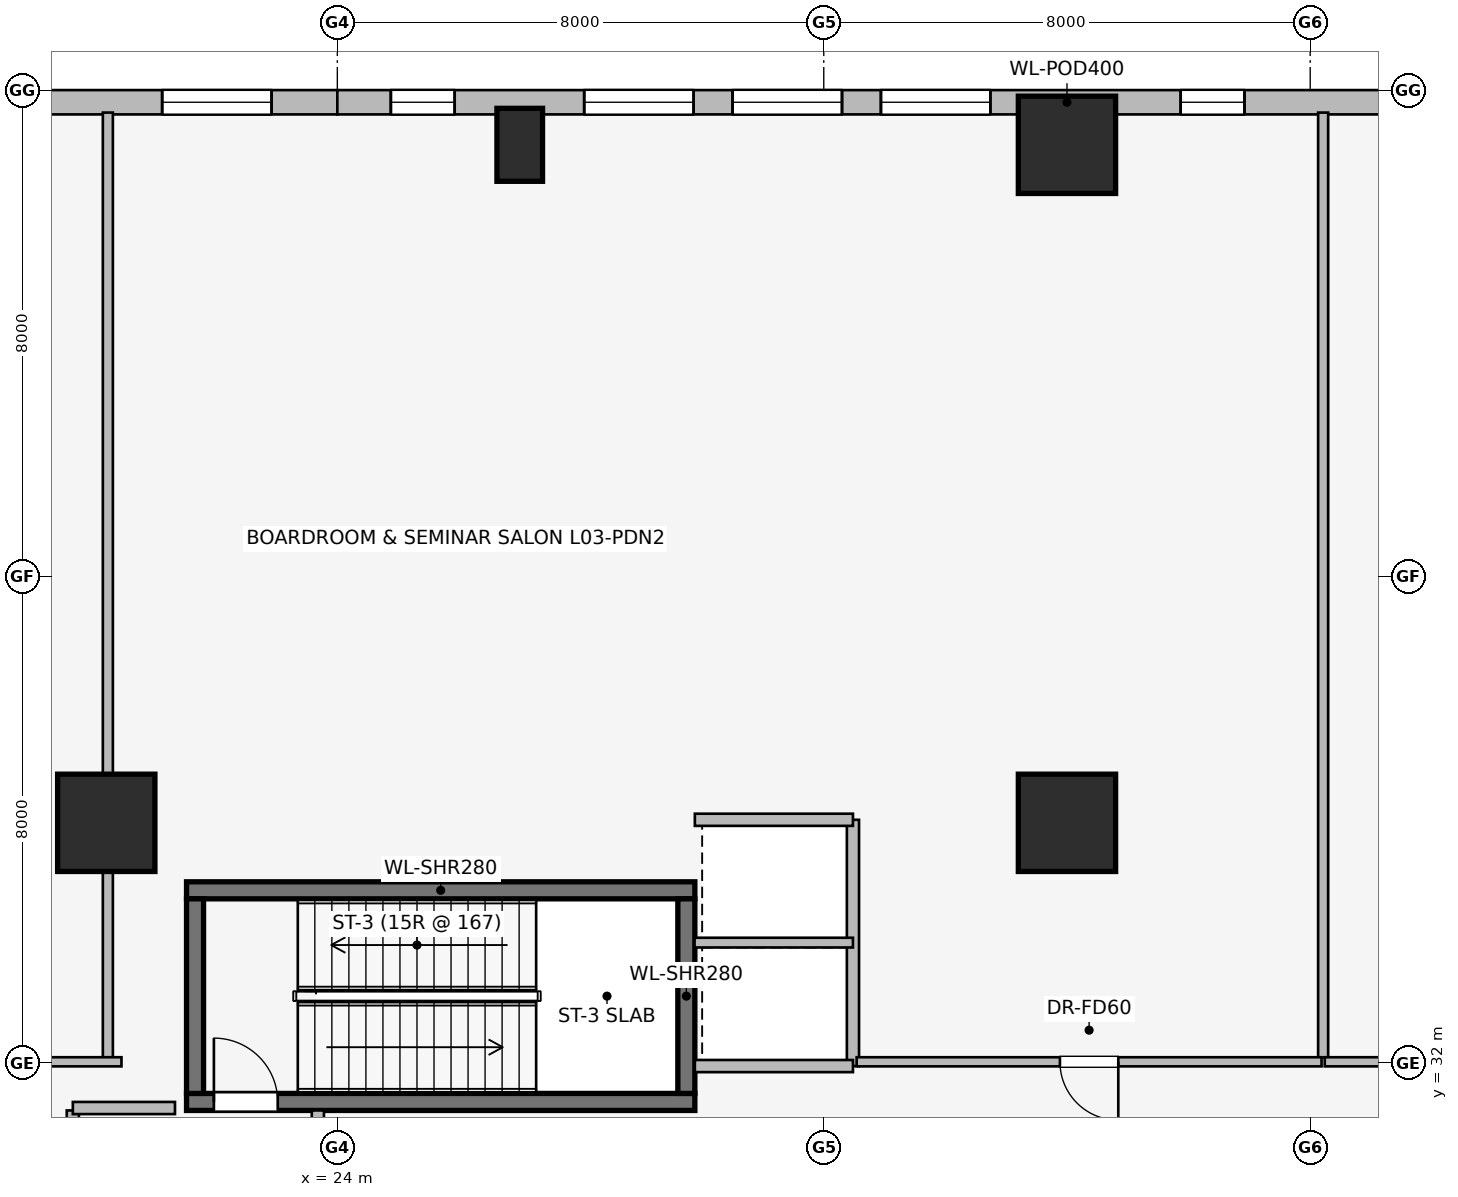
"""IFC4 building model, lengths in metres.
Left out: names, types, materials, properties, quantities, classifications, styles, units other than length and angle.
Written with IfcOpenShell. Run it as: python <this file> out.ifc"""

import sys

from ifc_helpers import new_model, si_unit, direction, frame, frame_2d, origin, origin_2d, place, context, subcontext, project, spatial, rectangle, extrude, element, fill, save


model = new_model("IFC4")
c1 = context("Model", 3, precision=1e-05, world=origin(), true_north=direction((0.0, 1.0)))
c2 = subcontext(c1, "Body", "Model", "MODEL_VIEW")
j1 = project(units=[si_unit("LENGTHUNIT", "METRE"), si_unit("PLANEANGLEUNIT", "RADIAN")], contexts=[c1])
p1 = place(None, origin())
s1 = spatial("IfcSite", under=j1, at=p1, CompositionType="ELEMENT")
p2 = place(p1, origin())
s2 = spatial("IfcBuilding", under=s1, at=p2, CompositionType="ELEMENT")
p3 = place(p2, frame((0.0, 0.0, 11.0)))
s3 = spatial("IfcBuildingStorey", under=s2, at=p3, CompositionType="ELEMENT", Elevation=11.0)
p4 = place(p3, frame((21.52, 31.36, 0.0), z_axis=(0.0, 0.0, 1.0), x_axis=(1.0, 0.0, 0.0)))
e1 = element("IfcWall", 1, at=p4, inside=s3, PredefinedType="SHEAR", context=c2, shape_type="SweptSolid", body=[
    extrude(rectangle(XDim=8.36, YDim=0.28, at=frame_2d((4.18, 0.0))), origin(), (0.0, 0.0, 1.0), 5.0),
])
p5 = place(p4, frame((0.45, 0.0, 0.0)))
e2 = element("IfcOpeningElement", 2, at=p5, cuts=e1, PredefinedType="OPENING", context=c2, shape_type="SweptSolid", body=[
    extrude(rectangle(XDim=1.05, YDim=2.0, at=frame_2d((0.525, 1.0))), frame((0.0, 0.15, 0.0), z_axis=(0.0, -1.0, 0.0), x_axis=(1.0, 0.0, 0.0)), (0.0, 0.0, 1.0), 0.3),
])
p6 = place(p3, frame((29.88, 34.84, 0.0), z_axis=(0.0, 0.0, 1.0), x_axis=(-1.0, 0.0, 0.0)))
e3 = element("IfcWall", 3, at=p6, inside=s3, PredefinedType="SHEAR", context=c2, shape_type="SweptSolid", body=[
    extrude(rectangle(XDim=8.36, YDim=0.28, at=frame_2d((4.18, 0.0))), origin(), (0.0, 0.0, 1.0), 5.0),
])
for number, where, z_axis, x_axis in (
    (4, (21.66, 34.7, 0.0), (0.0, 0.0, 1.0), (0.0, -1.0, 0.0)),
    (5, (29.74, 31.5, 0.0), (0.0, 0.0, 1.0), (0.0, 1.0, 0.0)),
):
    element("IfcWall", number, at=place(p3, frame(where, z_axis=z_axis, x_axis=x_axis)), inside=s3, PredefinedType="SHEAR", context=c2, shape_type="SweptSolid", body=[
        extrude(rectangle(XDim=3.2, YDim=0.28, at=frame_2d((1.6, 0.0))), origin(), (0.0, 0.0, 1.0), 5.0),
    ])
for number, where, z_axis, x_axis in (
    (6, (36.0, 47.1, 0.0), (0.0, 0.0, 1.0), (1.0, 0.0, 0.0)),
    (7, (20.2, 35.95, 0.0), (0.0, 0.0, 1.0), (1.0, 0.0, 0.0)),
    (8, (36.0, 35.95, 0.0), (0.0, 0.0, 1.0), (1.0, 0.0, 0.0)),
):
    element("IfcColumn", number, at=place(p3, frame(where, z_axis=z_axis, x_axis=x_axis)), inside=s3, PredefinedType="COLUMN", context=c2, shape_type="SweptSolid", body=[
        extrude(rectangle(XDim=1.6, YDim=1.6, at=origin_2d()), origin(), (0.0, 0.0, 1.0), 5.0),
    ])
p7 = place(p3, frame((27.0, 47.1, 0.0), z_axis=(0.0, 0.0, 1.0), x_axis=(1.0, 0.0, 0.0)))
e9 = element("IfcColumn", 9, at=p7, inside=s3, PredefinedType="PILASTER", context=c2, shape_type="SweptSolid", body=[
    extrude(rectangle(XDim=0.75, YDim=1.2, at=origin_2d()), origin(), (0.0, 0.0, 1.0), 5.0),
])
p8 = place(p3, frame((0.0, 47.8, 0.0), z_axis=(0.0, 0.0, 1.0), x_axis=(1.0, 0.0, 0.0)))
e10 = element("IfcWall", 10, at=p8, inside=s3, PredefinedType="STANDARD", context=c2, shape_type="SweptSolid", body=[
    extrude(rectangle(XDim=24.0, YDim=0.4, at=frame_2d((12.0, 0.0))), origin(), (0.0, 0.0, 1.0), 4.69),
])
p9 = place(p8, frame((3.65, 0.0, 0.75)))
e11 = element("IfcOpeningElement", 11, at=p9, cuts=e10, PredefinedType="OPENING", context=c2, shape_type="SweptSolid", body=[
    extrude(rectangle(XDim=2.8, YDim=1.8, at=frame_2d((1.4, 0.9))), frame((0.0, 0.21, 0.0), z_axis=(0.0, -1.0, 0.0), x_axis=(1.0, 0.0, 0.0)), (0.0, 0.0, 1.0), 0.42),
])
p10 = place(p8, frame((10.27, 0.0, 0.75)))
e12 = element("IfcOpeningElement", 12, at=p10, cuts=e10, PredefinedType="OPENING", context=c2, shape_type="SweptSolid", body=[
    extrude(rectangle(XDim=1.8, YDim=1.5, at=frame_2d((0.9, 0.75))), frame((0.0, 0.21, 0.0), z_axis=(0.0, -1.0, 0.0), x_axis=(1.0, 0.0, 0.0)), (0.0, 0.0, 1.0), 0.42),
])
p11 = place(p8, frame((13.13, 0.0, 0.75)))
e13 = element("IfcOpeningElement", 13, at=p11, cuts=e10, PredefinedType="OPENING", context=c2, shape_type="SweptSolid", body=[
    extrude(rectangle(XDim=1.8, YDim=1.5, at=frame_2d((0.9, 0.75))), frame((0.0, 0.21, 0.0), z_axis=(0.0, -1.0, 0.0), x_axis=(1.0, 0.0, 0.0)), (0.0, 0.0, 1.0), 0.42),
])
p12 = place(p8, frame((18.077, 0.0, 0.75)))
e14 = element("IfcOpeningElement", 14, at=p12, cuts=e10, PredefinedType="OPENING", context=c2, shape_type="SweptSolid", body=[
    extrude(rectangle(XDim=1.05, YDim=1.4, at=frame_2d((0.525, 0.7))), frame((0.0, 0.21, 0.0), z_axis=(0.0, -1.0, 0.0), x_axis=(1.0, 0.0, 0.0)), (0.0, 0.0, 1.0), 0.42),
])
p13 = place(p8, frame((21.119, 0.0, 0.75)))
e15 = element("IfcOpeningElement", 15, at=p13, cuts=e10, PredefinedType="OPENING", context=c2, shape_type="SweptSolid", body=[
    extrude(rectangle(XDim=1.8, YDim=1.5, at=frame_2d((0.9, 0.75))), frame((0.0, 0.21, 0.0), z_axis=(0.0, -1.0, 0.0), x_axis=(1.0, 0.0, 0.0)), (0.0, 0.0, 1.0), 0.42),
])
p14 = place(p3, frame((24.0, 47.8, 0.0), z_axis=(0.0, 0.0, 1.0), x_axis=(1.0, 0.0, 0.0)))
e16 = element("IfcWall", 16, at=p14, inside=s3, PredefinedType="STANDARD", context=c2, shape_type="SweptSolid", body=[
    extrude(rectangle(XDim=24.0, YDim=0.4, at=frame_2d((12.0, 0.0))), origin(), (0.0, 0.0, 1.0), 4.69),
])
p15 = place(p14, frame((0.88, 0.0, 0.75)))
e17 = element("IfcOpeningElement", 17, at=p15, cuts=e16, PredefinedType="OPENING", context=c2, shape_type="SweptSolid", body=[
    extrude(rectangle(XDim=1.05, YDim=1.4, at=frame_2d((0.525, 0.7))), frame((0.0, 0.21, 0.0), z_axis=(0.0, -1.0, 0.0), x_axis=(1.0, 0.0, 0.0)), (0.0, 0.0, 1.0), 0.42),
])
p16 = place(p14, frame((4.06, 0.0, 0.75)))
e18 = element("IfcOpeningElement", 18, at=p16, cuts=e16, PredefinedType="OPENING", context=c2, shape_type="SweptSolid", body=[
    extrude(rectangle(XDim=1.8, YDim=1.5, at=frame_2d((0.9, 0.75))), frame((0.0, 0.21, 0.0), z_axis=(0.0, -1.0, 0.0), x_axis=(1.0, 0.0, 0.0)), (0.0, 0.0, 1.0), 0.42),
])
p17 = place(p14, frame((6.5, 0.0, 0.75)))
e19 = element("IfcOpeningElement", 19, at=p17, cuts=e16, PredefinedType="OPENING", context=c2, shape_type="SweptSolid", body=[
    extrude(rectangle(XDim=1.8, YDim=1.5, at=frame_2d((0.9, 0.75))), frame((0.0, 0.21, 0.0), z_axis=(0.0, -1.0, 0.0), x_axis=(1.0, 0.0, 0.0)), (0.0, 0.0, 1.0), 0.42),
])
p18 = place(p14, frame((8.94, 0.0, 0.75)))
e20 = element("IfcOpeningElement", 20, at=p18, cuts=e16, PredefinedType="OPENING", context=c2, shape_type="SweptSolid", body=[
    extrude(rectangle(XDim=1.8, YDim=1.5, at=frame_2d((0.9, 0.75))), frame((0.0, 0.21, 0.0), z_axis=(0.0, -1.0, 0.0), x_axis=(1.0, 0.0, 0.0)), (0.0, 0.0, 1.0), 0.42),
])
p19 = place(p14, frame((13.87, 0.0, 0.75)))
e21 = element("IfcOpeningElement", 21, at=p19, cuts=e16, PredefinedType="OPENING", context=c2, shape_type="SweptSolid", body=[
    extrude(rectangle(XDim=1.05, YDim=1.4, at=frame_2d((0.525, 0.7))), frame((0.0, 0.21, 0.0), z_axis=(0.0, -1.0, 0.0), x_axis=(1.0, 0.0, 0.0)), (0.0, 0.0, 1.0), 0.42),
])
p20 = place(p14, frame((17.518, 0.0, 0.75)))
e22 = element("IfcOpeningElement", 22, at=p20, cuts=e16, PredefinedType="OPENING", context=c2, shape_type="SweptSolid", body=[
    extrude(rectangle(XDim=1.8, YDim=1.5, at=frame_2d((0.9, 0.75))), frame((0.0, 0.21, 0.0), z_axis=(0.0, -1.0, 0.0), x_axis=(1.0, 0.0, 0.0)), (0.0, 0.0, 1.0), 0.42),
])
p21 = place(p14, frame((22.07, 0.0, 0.75)))
e23 = element("IfcOpeningElement", 23, at=p21, cuts=e16, PredefinedType="OPENING", context=c2, shape_type="SweptSolid", body=[
    extrude(rectangle(XDim=1.05, YDim=1.4, at=frame_2d((0.525, 0.7))), frame((0.0, 0.21, 0.0), z_axis=(0.0, -1.0, 0.0), x_axis=(1.0, 0.0, 0.0)), (0.0, 0.0, 1.0), 0.42),
])
p22 = place(p3, frame((19.65, 25.68, 0.0), z_axis=(0.0, 0.0, 1.0), x_axis=(0.0, 1.0, 0.0)))
e24 = element("IfcWall", 24, at=p22, inside=s3, PredefinedType="PARTITIONING", context=c2, shape_type="SweptSolid", body=[
    extrude(rectangle(XDim=5.54, YDim=0.2, at=frame_2d((2.77, 0.0))), origin(), (0.0, 0.0, 1.0), 4.69),
])
p23 = place(p22, frame((0.62, 0.0, 0.0)))
e25 = element("IfcOpeningElement", 25, at=p23, cuts=e24, PredefinedType="OPENING", context=c2, shape_type="SweptSolid", body=[
    extrude(rectangle(XDim=1.1, YDim=2.2, at=frame_2d((0.55, 1.1))), frame((0.0, 0.11, 0.0), z_axis=(0.0, -1.0, 0.0), x_axis=(1.0, 0.0, 0.0)), (0.0, 0.0, 1.0), 0.22),
])
p24 = place(p22, frame((3.12, 0.0, 0.0)))
e26 = element("IfcOpeningElement", 26, at=p24, cuts=e24, PredefinedType="OPENING", context=c2, shape_type="SweptSolid", body=[
    extrude(rectangle(XDim=1.1, YDim=2.2, at=frame_2d((0.55, 1.1))), frame((0.0, 0.11, 0.0), z_axis=(0.0, -1.0, 0.0), x_axis=(1.0, 0.0, 0.0)), (0.0, 0.0, 1.0), 0.22),
])
p25 = place(p3, frame((23.68, 25.68, 0.0), z_axis=(0.0, 0.0, 1.0), x_axis=(0.0, 1.0, 0.0)))
e27 = element("IfcWall", 27, at=p25, inside=s3, PredefinedType="PARTITIONING", context=c2, shape_type="SweptSolid", body=[
    extrude(rectangle(XDim=5.54, YDim=0.2, at=frame_2d((2.77, 0.0))), origin(), (0.0, 0.0, 1.0), 4.69),
])
p26 = place(p25, frame((1.8, 0.0, 0.0)))
e28 = element("IfcOpeningElement", 28, at=p26, cuts=e27, PredefinedType="OPENING", context=c2, shape_type="SweptSolid", body=[
    extrude(rectangle(XDim=1.05, YDim=2.0, at=frame_2d((0.525, 1.0))), frame((0.0, 0.11, 0.0), z_axis=(0.0, -1.0, 0.0), x_axis=(1.0, 0.0, 0.0)), (0.0, 0.0, 1.0), 0.22),
])
p27 = place(p3, frame((21.33, 31.26, 0.0), z_axis=(0.0, 0.0, 1.0), x_axis=(-1.0, 0.0, 0.0)))
e29 = element("IfcWall", 29, at=p27, inside=s3, PredefinedType="PARTITIONING", context=c2, shape_type="SweptSolid", body=[
    extrude(rectangle(XDim=1.68, YDim=0.2, at=frame_2d((0.84, 0.0))), origin(), (0.0, 0.0, 1.0), 4.69),
])
p28 = place(p3, frame((32.48, 31.95, 0.0), z_axis=(0.0, 0.0, 1.0), x_axis=(0.0, 1.0, 0.0)))
e30 = element("IfcWall", 30, at=p28, inside=s3, PredefinedType="PARTITIONING", context=c2, shape_type="SweptSolid", body=[
    extrude(rectangle(XDim=4.05, YDim=0.2, at=frame_2d((2.025, 0.0))), origin(), (0.0, 0.0, 1.0), 4.69),
])
p29 = place(p3, frame((29.88, 36.0, 0.0), z_axis=(0.0, 0.0, 1.0), x_axis=(1.0, 0.0, 0.0)))
e31 = element("IfcWall", 31, at=p29, inside=s3, PredefinedType="PARTITIONING", context=c2, shape_type="SweptSolid", body=[
    extrude(rectangle(XDim=2.6, YDim=0.2, at=frame_2d((1.3, 0.0))), origin(), (0.0, 0.0, 1.0), 3.742),
])
p30 = place(p3, frame((32.48, 31.95, 0.0), z_axis=(0.0, 0.0, 1.0), x_axis=(-1.0, 0.0, 0.0)))
e32 = element("IfcWall", 32, at=p30, inside=s3, PredefinedType="PARTITIONING", context=c2, shape_type="SweptSolid", body=[
    extrude(rectangle(XDim=2.6, YDim=0.2, at=frame_2d((1.3, 0.0))), origin(), (0.0, 0.0, 1.0), 4.69),
])
p31 = place(p3, frame((29.875, 33.98, 0.0), z_axis=(0.0, 0.0, 1.0), x_axis=(1.0, 0.0, 0.0)))
e33 = element("IfcWall", 33, at=p31, inside=s3, PredefinedType="PARTITIONING", context=c2, shape_type="SweptSolid", body=[
    extrude(rectangle(XDim=2.605, YDim=0.16, at=frame_2d((1.302, 0.0))), origin(), (0.0, 0.0, 1.0), 4.69),
])
p32 = place(p3, frame((20.226, 32.09, 0.0), z_axis=(0.0, 0.0, 1.0), x_axis=(0.0, 1.0, 0.0)))
e34 = element("IfcWall", 34, at=p32, inside=s3, PredefinedType="PARTITIONING", context=c2, shape_type="SweptSolid", body=[
    extrude(rectangle(XDim=15.54, YDim=0.165, at=frame_2d((7.77, 0.0))), origin(), (0.0, 0.0, 1.0), 4.69),
])
p33 = place(p3, frame((40.213, 32.09, 0.0), z_axis=(0.0, 0.0, 1.0), x_axis=(0.0, 1.0, 0.0)))
e35 = element("IfcWall", 35, at=p33, inside=s3, PredefinedType="PARTITIONING", context=c2, shape_type="SweptSolid", body=[
    extrude(rectangle(XDim=15.54, YDim=0.165, at=frame_2d((7.77, 0.0))), origin(), (0.0, 0.0, 1.0), 4.082),
])
p34 = place(p3, frame((20.45, 32.02, 0.0), z_axis=(0.0, 0.0, 1.0), x_axis=(-1.0, 0.0, 0.0)))
e36 = element("IfcWall", 36, at=p34, inside=s3, PredefinedType="PARTITIONING", context=c2, shape_type="SweptSolid", body=[
    extrude(rectangle(XDim=20.055, YDim=0.15, at=frame_2d((10.027, 0.0))), origin(), (0.0, 0.0, 1.0), 3.742),
])
p35 = place(p34, frame((9.5, 0.0, 0.0)))
e37 = element("IfcOpeningElement", 37, at=p35, cuts=e36, PredefinedType="OPENING", context=c2, shape_type="SweptSolid", body=[
    extrude(rectangle(XDim=0.96, YDim=2.0, at=frame_2d((0.48, 1.0))), frame((0.0, 0.085, 0.0), z_axis=(0.0, -1.0, 0.0), x_axis=(1.0, 0.0, 0.0)), (0.0, 0.0, 1.0), 0.17),
])
p36 = place(p3, frame((40.187, 32.02, 0.0), z_axis=(0.0, 0.0, 1.0), x_axis=(-1.0, 0.0, 0.0)))
e38 = element("IfcWall", 38, at=p36, inside=s3, PredefinedType="PARTITIONING", context=c2, shape_type="SweptSolid", body=[
    extrude(rectangle(XDim=7.646, YDim=0.15, at=frame_2d((3.823, 0.0))), origin(), (0.0, 0.0, 1.0), 4.69),
])
p37 = place(p36, frame((3.343, 0.0, 0.0)))
e39 = element("IfcOpeningElement", 39, at=p37, cuts=e38, PredefinedType="OPENING", context=c2, shape_type="SweptSolid", body=[
    extrude(rectangle(XDim=0.96, YDim=2.0, at=frame_2d((0.48, 1.0))), frame((0.0, 0.085, 0.0), z_axis=(0.0, -1.0, 0.0), x_axis=(1.0, 0.0, 0.0)), (0.0, 0.0, 1.0), 0.17),
])
p38 = place(p3, frame((57.214, 32.02, 0.0), z_axis=(0.0, 0.0, 1.0), x_axis=(-1.0, 0.0, 0.0)))
e40 = element("IfcWall", 40, at=p38, inside=s3, PredefinedType="PARTITIONING", context=c2, shape_type="SweptSolid", body=[
    extrude(rectangle(XDim=16.975, YDim=0.15, at=frame_2d((8.488, 0.0))), origin(), (0.0, 0.0, 1.0), 3.742),
])
p39 = place(p38, frame((7.956, 0.0, 0.0)))
e41 = element("IfcOpeningElement", 41, at=p39, cuts=e40, PredefinedType="OPENING", context=c2, shape_type="SweptSolid", body=[
    extrude(rectangle(XDim=0.96, YDim=2.0, at=frame_2d((0.48, 1.0))), frame((0.0, 0.085, 0.0), z_axis=(0.0, -1.0, 0.0), x_axis=(1.0, 0.0, 0.0)), (0.0, 0.0, 1.0), 0.17),
])
p40 = place(p13, origin())
e42 = element("IfcWindow", 42, at=p40, inside=s3, PartitioningType="SINGLE_PANEL", PredefinedType="WINDOW", context=c2, shape_type="SweptSolid", body=[
    extrude(rectangle(XDim=1.8, YDim=1.5, at=frame_2d((0.9, 0.75))), frame((0.0, 0.03, 0.0), z_axis=(0.0, -1.0, 0.0), x_axis=(1.0, 0.0, 0.0)), (0.0, 0.0, 1.0), 0.06),
])
fill(e15, e42)
p41 = place(p15, origin())
e43 = element("IfcWindow", 43, at=p41, inside=s3, PartitioningType="SINGLE_PANEL", PredefinedType="WINDOW", context=c2, shape_type="SweptSolid", body=[
    extrude(rectangle(XDim=1.05, YDim=1.4, at=frame_2d((0.525, 0.7))), frame((0.0, 0.03, 0.0), z_axis=(0.0, -1.0, 0.0), x_axis=(1.0, 0.0, 0.0)), (0.0, 0.0, 1.0), 0.06),
])
fill(e17, e43)
p42 = place(p16, origin())
e44 = element("IfcWindow", 44, at=p42, inside=s3, PartitioningType="SINGLE_PANEL", PredefinedType="WINDOW", context=c2, shape_type="SweptSolid", body=[
    extrude(rectangle(XDim=1.8, YDim=1.5, at=frame_2d((0.9, 0.75))), frame((0.0, 0.03, 0.0), z_axis=(0.0, -1.0, 0.0), x_axis=(1.0, 0.0, 0.0)), (0.0, 0.0, 1.0), 0.06),
])
fill(e18, e44)
p43 = place(p17, origin())
e45 = element("IfcWindow", 45, at=p43, inside=s3, PartitioningType="SINGLE_PANEL", PredefinedType="WINDOW", context=c2, shape_type="SweptSolid", body=[
    extrude(rectangle(XDim=1.8, YDim=1.5, at=frame_2d((0.9, 0.75))), frame((0.0, 0.03, 0.0), z_axis=(0.0, -1.0, 0.0), x_axis=(1.0, 0.0, 0.0)), (0.0, 0.0, 1.0), 0.06),
])
fill(e19, e45)
p44 = place(p18, origin())
e46 = element("IfcWindow", 46, at=p44, inside=s3, PartitioningType="SINGLE_PANEL", PredefinedType="WINDOW", context=c2, shape_type="SweptSolid", body=[
    extrude(rectangle(XDim=1.8, YDim=1.5, at=frame_2d((0.9, 0.75))), frame((0.0, 0.03, 0.0), z_axis=(0.0, -1.0, 0.0), x_axis=(1.0, 0.0, 0.0)), (0.0, 0.0, 1.0), 0.06),
])
fill(e20, e46)
p45 = place(p19, origin())
e47 = element("IfcWindow", 47, at=p45, inside=s3, PartitioningType="SINGLE_PANEL", PredefinedType="WINDOW", context=c2, shape_type="SweptSolid", body=[
    extrude(rectangle(XDim=1.05, YDim=1.4, at=frame_2d((0.525, 0.7))), frame((0.0, 0.03, 0.0), z_axis=(0.0, -1.0, 0.0), x_axis=(1.0, 0.0, 0.0)), (0.0, 0.0, 1.0), 0.06),
])
fill(e21, e47)
p46 = place(p5, origin())
e48 = element("IfcDoor", 48, at=p46, inside=s3, OperationType="SINGLE_SWING_LEFT", PredefinedType="DOOR", context=c2, shape_type="SweptSolid", body=[
    extrude(rectangle(XDim=1.05, YDim=2.0, at=frame_2d((0.525, 1.0))), frame((0.0, 0.025, 0.0), z_axis=(0.0, -1.0, 0.0), x_axis=(1.0, 0.0, 0.0)), (0.0, 0.0, 1.0), 0.05),
])
fill(e2, e48)
p47 = place(p37, origin())
e49 = element("IfcDoor", 49, at=p47, inside=s3, OperationType="SINGLE_SWING_LEFT", PredefinedType="DOOR", context=c2, shape_type="SweptSolid", body=[
    extrude(rectangle(XDim=0.96, YDim=2.0, at=frame_2d((0.48, 1.0))), frame((0.0, 0.025, 0.0), z_axis=(0.0, -1.0, 0.0), x_axis=(1.0, 0.0, 0.0)), (0.0, 0.0, 1.0), 0.05),
])
fill(e39, e49)
save(model, sys.argv[1])
